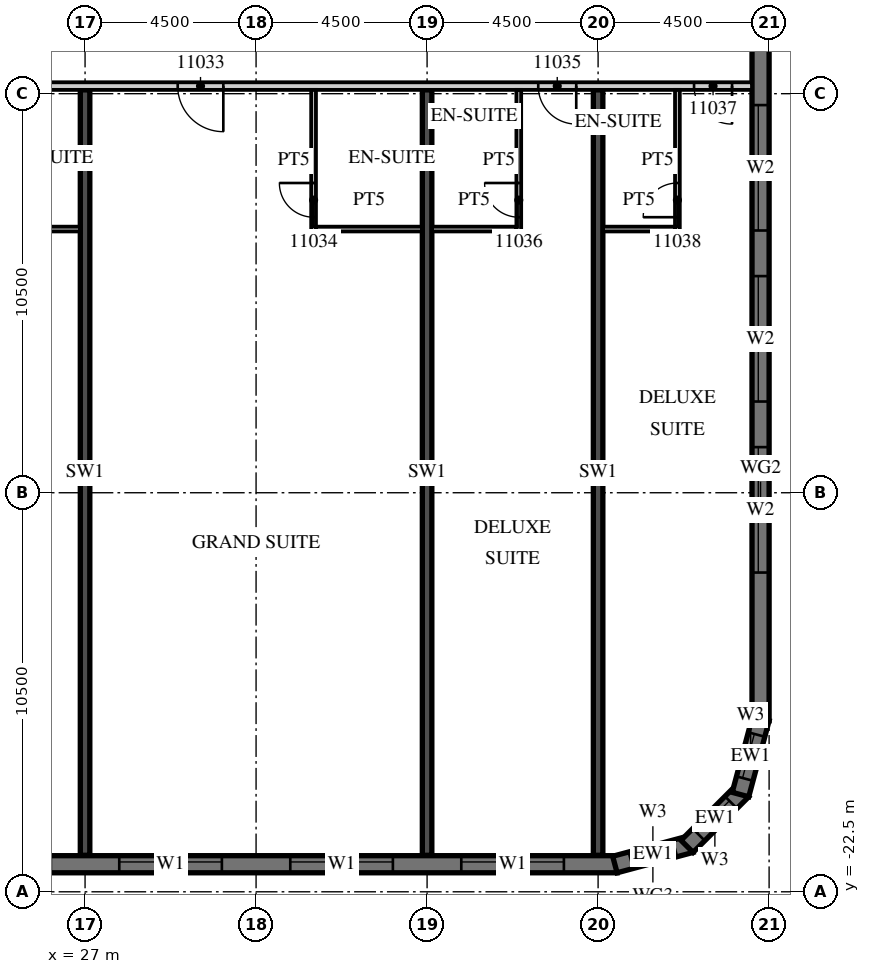
"""IFC4 building model, lengths in metres.
Left out: names, types, materials, properties, quantities, classifications, styles, units other than length and angle.
Written with IfcOpenShell. Run it as: python <this file> out.ifc"""

import sys

from ifc_helpers import new_model, si_unit, direction, frame, frame_2d, origin, place, context, subcontext, project, spatial, polyline, rectangle, outline, extrude, element, fill, save


model = new_model("IFC4")
c1 = context("Model", 3, precision=1e-05, world=origin(), true_north=direction((0.0, 1.0)))
c2 = subcontext(c1, "Body", "Model", "MODEL_VIEW")
j1 = project(units=[si_unit("LENGTHUNIT", "METRE"), si_unit("PLANEANGLEUNIT", "RADIAN")], contexts=[c1])
p1 = place(None, origin())
s1 = spatial("IfcSite", under=j1, at=p1, CompositionType="ELEMENT")
p2 = place(p1, origin())
s2 = spatial("IfcBuilding", under=s1, at=p2, CompositionType="ELEMENT")
p3 = place(p2, frame((0.0, 0.0, 66.6)))
s3 = spatial("IfcBuildingStorey", under=s2, at=p3, CompositionType="ELEMENT", Elevation=66.6)
for number, where, z_axis, x_axis in (
    (1, (27.0, -21.54, 0.0), (0.0, 0.0, 1.0), (0.0, 1.0, 0.0)),
    (2, (36.0, -21.54, 0.0), (0.0, 0.0, 1.0), (0.0, 1.0, 0.0)),
    (3, (40.5, -21.54, 0.0), (0.0, 0.0, 1.0), (0.0, 1.0, 0.0)),
):
    element("IfcWall", number, at=place(p3, frame(where, z_axis=z_axis, x_axis=x_axis)), inside=s3, PredefinedType="SHEAR", context=c2, shape_type="SweptSolid", body=[
        extrude(rectangle(XDim=20.14, YDim=0.25, at=frame_2d((10.07, 0.0))), origin(), (0.0, 0.0, 1.0), 3.3),
    ])
p4 = place(p3, frame((-13.5, -21.775, 0.0), z_axis=(0.0, 0.0, 1.0), x_axis=(1.0, 0.0, 0.0)))
e4 = element("IfcWall", 4, at=p4, inside=s3, PredefinedType="SOLIDWALL", context=c2, shape_type="SweptSolid", body=[
    extrude(rectangle(XDim=54.5, YDim=0.45, at=frame_2d((27.25, 0.0))), origin(), (0.0, 0.0, 1.0), 3.02),
])
p5 = place(p4, frame((0.9, 0.0, 0.45)))
e5 = element("IfcOpeningElement", 5, at=p5, cuts=e4, PredefinedType="OPENING", context=c2, shape_type="SweptSolid", body=[
    extrude(rectangle(XDim=2.7, YDim=2.25, at=frame_2d((1.35, 1.125))), frame((0.0, 0.235, 0.0), z_axis=(0.0, -1.0, 0.0), x_axis=(1.0, 0.0, 0.0)), (0.0, 0.0, 1.0), 0.47),
])
p6 = place(p4, frame((5.4, 0.0, 0.45)))
e6 = element("IfcOpeningElement", 6, at=p6, cuts=e4, PredefinedType="OPENING", context=c2, shape_type="SweptSolid", body=[
    extrude(rectangle(XDim=2.7, YDim=2.25, at=frame_2d((1.35, 1.125))), frame((0.0, 0.235, 0.0), z_axis=(0.0, -1.0, 0.0), x_axis=(1.0, 0.0, 0.0)), (0.0, 0.0, 1.0), 0.47),
])
p7 = place(p4, frame((9.9, 0.0, 0.45)))
e7 = element("IfcOpeningElement", 7, at=p7, cuts=e4, PredefinedType="OPENING", context=c2, shape_type="SweptSolid", body=[
    extrude(rectangle(XDim=2.7, YDim=2.25, at=frame_2d((1.35, 1.125))), frame((0.0, 0.235, 0.0), z_axis=(0.0, -1.0, 0.0), x_axis=(1.0, 0.0, 0.0)), (0.0, 0.0, 1.0), 0.47),
])
p8 = place(p4, frame((14.4, 0.0, 0.45)))
e8 = element("IfcOpeningElement", 8, at=p8, cuts=e4, PredefinedType="OPENING", context=c2, shape_type="SweptSolid", body=[
    extrude(rectangle(XDim=2.7, YDim=2.25, at=frame_2d((1.35, 1.125))), frame((0.0, 0.235, 0.0), z_axis=(0.0, -1.0, 0.0), x_axis=(1.0, 0.0, 0.0)), (0.0, 0.0, 1.0), 0.47),
])
p9 = place(p4, frame((18.9, 0.0, 0.45)))
e9 = element("IfcOpeningElement", 9, at=p9, cuts=e4, PredefinedType="OPENING", context=c2, shape_type="SweptSolid", body=[
    extrude(rectangle(XDim=2.7, YDim=2.25, at=frame_2d((1.35, 1.125))), frame((0.0, 0.235, 0.0), z_axis=(0.0, -1.0, 0.0), x_axis=(1.0, 0.0, 0.0)), (0.0, 0.0, 1.0), 0.47),
])
p10 = place(p4, frame((23.4, 0.0, 0.45)))
e10 = element("IfcOpeningElement", 10, at=p10, cuts=e4, PredefinedType="OPENING", context=c2, shape_type="SweptSolid", body=[
    extrude(rectangle(XDim=2.7, YDim=2.25, at=frame_2d((1.35, 1.125))), frame((0.0, 0.235, 0.0), z_axis=(0.0, -1.0, 0.0), x_axis=(1.0, 0.0, 0.0)), (0.0, 0.0, 1.0), 0.47),
])
p11 = place(p4, frame((27.9, 0.0, 0.45)))
e11 = element("IfcOpeningElement", 11, at=p11, cuts=e4, PredefinedType="OPENING", context=c2, shape_type="SweptSolid", body=[
    extrude(rectangle(XDim=2.7, YDim=2.25, at=frame_2d((1.35, 1.125))), frame((0.0, 0.235, 0.0), z_axis=(0.0, -1.0, 0.0), x_axis=(1.0, 0.0, 0.0)), (0.0, 0.0, 1.0), 0.47),
])
p12 = place(p4, frame((32.4, 0.0, 0.45)))
e12 = element("IfcOpeningElement", 12, at=p12, cuts=e4, PredefinedType="OPENING", context=c2, shape_type="SweptSolid", body=[
    extrude(rectangle(XDim=2.7, YDim=2.25, at=frame_2d((1.35, 1.125))), frame((0.0, 0.235, 0.0), z_axis=(0.0, -1.0, 0.0), x_axis=(1.0, 0.0, 0.0)), (0.0, 0.0, 1.0), 0.47),
])
p13 = place(p4, frame((36.9, 0.0, 0.45)))
e13 = element("IfcOpeningElement", 13, at=p13, cuts=e4, PredefinedType="OPENING", context=c2, shape_type="SweptSolid", body=[
    extrude(rectangle(XDim=2.7, YDim=2.25, at=frame_2d((1.35, 1.125))), frame((0.0, 0.235, 0.0), z_axis=(0.0, -1.0, 0.0), x_axis=(1.0, 0.0, 0.0)), (0.0, 0.0, 1.0), 0.47),
])
p14 = place(p4, frame((41.4, 0.0, 0.45)))
e14 = element("IfcOpeningElement", 14, at=p14, cuts=e4, PredefinedType="OPENING", context=c2, shape_type="SweptSolid", body=[
    extrude(rectangle(XDim=2.7, YDim=2.25, at=frame_2d((1.35, 1.125))), frame((0.0, 0.235, 0.0), z_axis=(0.0, -1.0, 0.0), x_axis=(1.0, 0.0, 0.0)), (0.0, 0.0, 1.0), 0.47),
])
p15 = place(p4, frame((45.9, 0.0, 0.45)))
e15 = element("IfcOpeningElement", 15, at=p15, cuts=e4, PredefinedType="OPENING", context=c2, shape_type="SweptSolid", body=[
    extrude(rectangle(XDim=2.7, YDim=2.25, at=frame_2d((1.35, 1.125))), frame((0.0, 0.235, 0.0), z_axis=(0.0, -1.0, 0.0), x_axis=(1.0, 0.0, 0.0)), (0.0, 0.0, 1.0), 0.47),
])
p16 = place(p4, frame((50.4, 0.0, 0.45)))
e16 = element("IfcOpeningElement", 16, at=p16, cuts=e4, PredefinedType="OPENING", context=c2, shape_type="SweptSolid", body=[
    extrude(rectangle(XDim=2.7, YDim=2.25, at=frame_2d((1.35, 1.125))), frame((0.0, 0.235, 0.0), z_axis=(0.0, -1.0, 0.0), x_axis=(1.0, 0.0, 0.0)), (0.0, 0.0, 1.0), 0.47),
])
p17 = place(p3, frame((40.942, -21.783, 0.0), z_axis=(0.0, 0.0, 1.0), x_axis=(0.965926999034, 0.25881466832, 0.0)))
e17 = element("IfcWall", 17, at=p17, inside=s3, PredefinedType="SOLIDWALL", context=c2, shape_type="SweptSolid", body=[
    extrude(outline(polyline([(0.0, -0.225), (2.071, -0.225), (1.95, 0.225), (0.121, 0.225), (0.0, -0.225)])), origin(), (0.0, 0.0, 1.0), 3.02),
])
p18 = place(p17, frame((0.435, 0.0, 0.45)))
e18 = element("IfcOpeningElement", 18, at=p18, cuts=e17, PredefinedType="OPENING", context=c2, shape_type="SweptSolid", body=[
    extrude(rectangle(XDim=1.2, YDim=2.25, at=frame_2d((0.6, 1.125))), frame((0.0, 0.235, 0.0), z_axis=(0.0, -1.0, 0.0), x_axis=(1.0, 0.0, 0.0)), (0.0, 0.0, 1.0), 0.47),
])
p19 = place(p3, frame((42.841, -21.305, 0.0), z_axis=(0.0, 0.0, 1.0), x_axis=(0.707106781187, 0.707106781187, 0.0)))
e19 = element("IfcWall", 19, at=p19, inside=s3, PredefinedType="SOLIDWALL", context=c2, shape_type="SweptSolid", body=[
    extrude(outline(polyline([(0.0, -0.225), (2.071, -0.225), (1.95, 0.225), (0.121, 0.225), (0.0, -0.225)])), origin(), (0.0, 0.0, 1.0), 3.02),
])
p20 = place(p19, frame((0.435, 0.0, 0.45)))
e20 = element("IfcOpeningElement", 20, at=p20, cuts=e19, PredefinedType="OPENING", context=c2, shape_type="SweptSolid", body=[
    extrude(rectangle(XDim=1.2, YDim=2.25, at=frame_2d((0.6, 1.125))), frame((0.0, 0.235, 0.0), z_axis=(0.0, -1.0, 0.0), x_axis=(1.0, 0.0, 0.0)), (0.0, 0.0, 1.0), 0.47),
])
p21 = place(p3, frame((44.247, -19.942, 0.0), z_axis=(0.0, 0.0, 1.0), x_axis=(0.25881466832, 0.965926999034, 0.0)))
e21 = element("IfcWall", 21, at=p21, inside=s3, PredefinedType="SOLIDWALL", context=c2, shape_type="SweptSolid", body=[
    extrude(outline(polyline([(-0.0, -0.225), (2.07, -0.225), (1.95, 0.225), (0.12, 0.225), (-0.0, -0.225)])), origin(), (0.0, 0.0, 1.0), 3.02),
])
p22 = place(p21, frame((0.435, 0.0, 0.45)))
e22 = element("IfcOpeningElement", 22, at=p22, cuts=e21, PredefinedType="OPENING", context=c2, shape_type="SweptSolid", body=[
    extrude(rectangle(XDim=1.2, YDim=2.25, at=frame_2d((0.6, 1.125))), frame((0.0, 0.235, 0.0), z_axis=(0.0, -1.0, 0.0), x_axis=(1.0, 0.0, 0.0)), (0.0, 0.0, 1.0), 0.47),
])
p23 = place(p3, frame((44.775, -18.0, 0.0), z_axis=(0.0, 0.0, 1.0), x_axis=(0.0, 1.0, 0.0)))
e23 = element("IfcWall", 23, at=p23, inside=s3, PredefinedType="SOLIDWALL", context=c2, shape_type="SweptSolid", body=[
    extrude(rectangle(XDim=36.0, YDim=0.45, at=frame_2d((18.0, 0.0))), origin(), (0.0, 0.0, 1.0), 3.02),
])
p24 = place(p23, frame((3.9, 0.0, 0.45)))
e24 = element("IfcOpeningElement", 24, at=p24, cuts=e23, PredefinedType="OPENING", context=c2, shape_type="SweptSolid", body=[
    extrude(rectangle(XDim=3.3, YDim=2.25, at=frame_2d((1.65, 1.125))), frame((0.0, 0.235, 0.0), z_axis=(0.0, -1.0, 0.0), x_axis=(1.0, 0.0, 0.0)), (0.0, 0.0, 1.0), 0.47),
])
p25 = place(p23, frame((8.4, 0.0, 0.45)))
e25 = element("IfcOpeningElement", 25, at=p25, cuts=e23, PredefinedType="OPENING", context=c2, shape_type="SweptSolid", body=[
    extrude(rectangle(XDim=3.3, YDim=2.25, at=frame_2d((1.65, 1.125))), frame((0.0, 0.235, 0.0), z_axis=(0.0, -1.0, 0.0), x_axis=(1.0, 0.0, 0.0)), (0.0, 0.0, 1.0), 0.47),
])
p26 = place(p23, frame((12.9, 0.0, 0.45)))
e26 = element("IfcOpeningElement", 26, at=p26, cuts=e23, PredefinedType="OPENING", context=c2, shape_type="SweptSolid", body=[
    extrude(rectangle(XDim=3.3, YDim=2.25, at=frame_2d((1.65, 1.125))), frame((0.0, 0.235, 0.0), z_axis=(0.0, -1.0, 0.0), x_axis=(1.0, 0.0, 0.0)), (0.0, 0.0, 1.0), 0.47),
])
p27 = place(p3, frame((-13.5, -1.3, 0.0), z_axis=(0.0, 0.0, 1.0), x_axis=(1.0, 0.0, 0.0)))
e27 = element("IfcWall", 27, at=p27, inside=s3, PredefinedType="PARTITIONING", context=c2, shape_type="SweptSolid", body=[
    extrude(rectangle(XDim=58.05, YDim=0.2, at=frame_2d((29.025, 0.0))), origin(), (0.0, 0.0, 1.0), 3.02),
])
p28 = place(p27, frame((2.925, 0.0, 0.0)))
e28 = element("IfcOpeningElement", 28, at=p28, cuts=e27, PredefinedType="OPENING", context=c2, shape_type="SweptSolid", body=[
    extrude(rectangle(XDim=1.0, YDim=2.1, at=frame_2d((0.5, 1.05))), frame((0.0, 0.11, 0.0), z_axis=(0.0, -1.0, 0.0), x_axis=(1.0, 0.0, 0.0)), (0.0, 0.0, 1.0), 0.22),
])
p29 = place(p27, frame((9.863, 0.0, 0.0)))
e29 = element("IfcOpeningElement", 29, at=p29, cuts=e27, PredefinedType="OPENING", context=c2, shape_type="SweptSolid", body=[
    extrude(rectangle(XDim=1.2, YDim=2.1, at=frame_2d((0.6, 1.05))), frame((0.0, 0.11, 0.0), z_axis=(0.0, -1.0, 0.0), x_axis=(1.0, 0.0, 0.0)), (0.0, 0.0, 1.0), 0.22),
])
p30 = place(p27, frame((16.45, 0.0, 0.0)))
e30 = element("IfcOpeningElement", 30, at=p30, cuts=e27, PredefinedType="OPENING", context=c2, shape_type="SweptSolid", body=[
    extrude(rectangle(XDim=1.0, YDim=2.1, at=frame_2d((0.5, 1.05))), frame((0.0, 0.11, 0.0), z_axis=(0.0, -1.0, 0.0), x_axis=(1.0, 0.0, 0.0)), (0.0, 0.0, 1.0), 0.22),
])
p31 = place(p27, frame((18.55, 0.0, 0.0)))
e31 = element("IfcOpeningElement", 31, at=p31, cuts=e27, PredefinedType="OPENING", context=c2, shape_type="SweptSolid", body=[
    extrude(rectangle(XDim=1.0, YDim=2.1, at=frame_2d((0.5, 1.05))), frame((0.0, 0.11, 0.0), z_axis=(0.0, -1.0, 0.0), x_axis=(1.0, 0.0, 0.0)), (0.0, 0.0, 1.0), 0.22),
])
p32 = place(p27, frame((24.938, 0.0, 0.0)))
e32 = element("IfcOpeningElement", 32, at=p32, cuts=e27, PredefinedType="OPENING", context=c2, shape_type="SweptSolid", body=[
    extrude(rectangle(XDim=1.2, YDim=2.1, at=frame_2d((0.6, 1.05))), frame((0.0, 0.11, 0.0), z_axis=(0.0, -1.0, 0.0), x_axis=(1.0, 0.0, 0.0)), (0.0, 0.0, 1.0), 0.22),
])
p33 = place(p27, frame((33.938, 0.0, 0.0)))
e33 = element("IfcOpeningElement", 33, at=p33, cuts=e27, PredefinedType="OPENING", context=c2, shape_type="SweptSolid", body=[
    extrude(rectangle(XDim=1.2, YDim=2.1, at=frame_2d((0.6, 1.05))), frame((0.0, 0.11, 0.0), z_axis=(0.0, -1.0, 0.0), x_axis=(1.0, 0.0, 0.0)), (0.0, 0.0, 1.0), 0.22),
])
p34 = place(p27, frame((42.938, 0.0, 0.0)))
e34 = element("IfcOpeningElement", 34, at=p34, cuts=e27, PredefinedType="OPENING", context=c2, shape_type="SweptSolid", body=[
    extrude(rectangle(XDim=1.2, YDim=2.1, at=frame_2d((0.6, 1.05))), frame((0.0, 0.11, 0.0), z_axis=(0.0, -1.0, 0.0), x_axis=(1.0, 0.0, 0.0)), (0.0, 0.0, 1.0), 0.22),
])
p35 = place(p27, frame((52.425, 0.0, 0.0)))
e35 = element("IfcOpeningElement", 35, at=p35, cuts=e27, PredefinedType="OPENING", context=c2, shape_type="SweptSolid", body=[
    extrude(rectangle(XDim=1.0, YDim=2.1, at=frame_2d((0.5, 1.05))), frame((0.0, 0.11, 0.0), z_axis=(0.0, -1.0, 0.0), x_axis=(1.0, 0.0, 0.0)), (0.0, 0.0, 1.0), 0.22),
])
p36 = place(p27, frame((56.525, 0.0, 0.0)))
e36 = element("IfcOpeningElement", 36, at=p36, cuts=e27, PredefinedType="OPENING", context=c2, shape_type="SweptSolid", body=[
    extrude(rectangle(XDim=1.0, YDim=2.1, at=frame_2d((0.5, 1.05))), frame((0.0, 0.11, 0.0), z_axis=(0.0, -1.0, 0.0), x_axis=(1.0, 0.0, 0.0)), (0.0, 0.0, 1.0), 0.22),
])
p37 = place(p3, frame((24.075, -5.062, 0.0), z_axis=(0.0, 0.0, 1.0), x_axis=(1.0, 0.0, 0.0)))
e37 = element("IfcWall", 37, at=p37, inside=s3, PredefinedType="PARTITIONING", context=c2, shape_type="SweptSolid", body=[
    extrude(rectangle(XDim=2.8, YDim=0.125, at=frame_2d((1.4, 0.0))), origin(), (0.0, 0.0, 1.0), 3.02),
])
p38 = place(p3, frame((33.013, -5.125, 0.0), z_axis=(0.0, 0.0, 1.0), x_axis=(0.0, 1.0, 0.0)))
e38 = element("IfcWall", 38, at=p38, inside=s3, PredefinedType="PARTITIONING", context=c2, shape_type="SweptSolid", body=[
    extrude(rectangle(XDim=3.725, YDim=0.125, at=frame_2d((1.863, 0.0))), origin(), (0.0, 0.0, 1.0), 3.02),
])
p39 = place(p38, frame((0.375, 0.0, 0.0)))
e39 = element("IfcOpeningElement", 39, at=p39, cuts=e38, PredefinedType="OPENING", context=c2, shape_type="SweptSolid", body=[
    extrude(rectangle(XDim=0.9, YDim=2.1, at=frame_2d((0.45, 1.05))), frame((0.0, 0.073, 0.0), z_axis=(0.0, -1.0, 0.0), x_axis=(1.0, 0.0, 0.0)), (0.0, 0.0, 1.0), 0.145),
])
p40 = place(p3, frame((33.075, -5.062, 0.0), z_axis=(0.0, 0.0, 1.0), x_axis=(1.0, 0.0, 0.0)))
e40 = element("IfcWall", 40, at=p40, inside=s3, PredefinedType="PARTITIONING", context=c2, shape_type="SweptSolid", body=[
    extrude(rectangle(XDim=2.8, YDim=0.125, at=frame_2d((1.4, 0.0))), origin(), (0.0, 0.0, 1.0), 3.02),
])
p41 = place(p3, frame((38.413, -5.125, 0.0), z_axis=(0.0, 0.0, 1.0), x_axis=(0.0, 1.0, 0.0)))
e41 = element("IfcWall", 41, at=p41, inside=s3, PredefinedType="PARTITIONING", context=c2, shape_type="SweptSolid", body=[
    extrude(rectangle(XDim=3.725, YDim=0.125, at=frame_2d((1.863, 0.0))), origin(), (0.0, 0.0, 1.0), 3.02),
])
p42 = place(p41, frame((0.375, 0.0, 0.0)))
e42 = element("IfcOpeningElement", 42, at=p42, cuts=e41, PredefinedType="OPENING", context=c2, shape_type="SweptSolid", body=[
    extrude(rectangle(XDim=0.9, YDim=2.1, at=frame_2d((0.45, 1.05))), frame((0.0, 0.073, 0.0), z_axis=(0.0, -1.0, 0.0), x_axis=(1.0, 0.0, 0.0)), (0.0, 0.0, 1.0), 0.145),
])
p43 = place(p3, frame((36.125, -5.062, 0.0), z_axis=(0.0, 0.0, 1.0), x_axis=(1.0, 0.0, 0.0)))
e43 = element("IfcWall", 43, at=p43, inside=s3, PredefinedType="PARTITIONING", context=c2, shape_type="SweptSolid", body=[
    extrude(rectangle(XDim=2.225, YDim=0.125, at=frame_2d((1.113, 0.0))), origin(), (0.0, 0.0, 1.0), 3.02),
])
p44 = place(p3, frame((42.587, -5.125, 0.0), z_axis=(0.0, 0.0, 1.0), x_axis=(0.0, 1.0, 0.0)))
e44 = element("IfcWall", 44, at=p44, inside=s3, PredefinedType="PARTITIONING", context=c2, shape_type="SweptSolid", body=[
    extrude(rectangle(XDim=3.725, YDim=0.125, at=frame_2d((1.863, 0.0))), origin(), (0.0, 0.0, 1.0), 3.02),
])
p45 = place(p44, frame((0.375, 0.0, 0.0)))
e45 = element("IfcOpeningElement", 45, at=p45, cuts=e44, PredefinedType="OPENING", context=c2, shape_type="SweptSolid", body=[
    extrude(rectangle(XDim=0.9, YDim=2.1, at=frame_2d((0.45, 1.05))), frame((0.0, 0.073, 0.0), z_axis=(0.0, -1.0, 0.0), x_axis=(1.0, 0.0, 0.0)), (0.0, 0.0, 1.0), 0.145),
])
p46 = place(p3, frame((40.625, -5.062, 0.0), z_axis=(0.0, 0.0, 1.0), x_axis=(1.0, 0.0, 0.0)))
e46 = element("IfcWall", 46, at=p46, inside=s3, PredefinedType="PARTITIONING", context=c2, shape_type="SweptSolid", body=[
    extrude(rectangle(XDim=1.9, YDim=0.125, at=frame_2d((0.95, 0.0))), origin(), (0.0, 0.0, 1.0), 3.02),
])
p47 = place(p14, origin())
e47 = element("IfcWindow", 47, at=p47, inside=s3, PartitioningType="SINGLE_PANEL", PredefinedType="WINDOW", context=c2, shape_type="SweptSolid", body=[
    extrude(rectangle(XDim=2.7, YDim=2.25, at=frame_2d((1.35, 1.125))), frame((0.0, 0.09, 0.0), z_axis=(0.0, -1.0, 0.0), x_axis=(1.0, 0.0, 0.0)), (0.0, 0.0, 1.0), 0.06),
])
fill(e14, e47)
p48 = place(p15, origin())
e48 = element("IfcWindow", 48, at=p48, inside=s3, PartitioningType="SINGLE_PANEL", PredefinedType="WINDOW", context=c2, shape_type="SweptSolid", body=[
    extrude(rectangle(XDim=2.7, YDim=2.25, at=frame_2d((1.35, 1.125))), frame((0.0, 0.09, 0.0), z_axis=(0.0, -1.0, 0.0), x_axis=(1.0, 0.0, 0.0)), (0.0, 0.0, 1.0), 0.06),
])
fill(e15, e48)
p49 = place(p16, origin())
e49 = element("IfcWindow", 49, at=p49, inside=s3, PartitioningType="SINGLE_PANEL", PredefinedType="WINDOW", context=c2, shape_type="SweptSolid", body=[
    extrude(rectangle(XDim=2.7, YDim=2.25, at=frame_2d((1.35, 1.125))), frame((0.0, 0.09, 0.0), z_axis=(0.0, -1.0, 0.0), x_axis=(1.0, 0.0, 0.0)), (0.0, 0.0, 1.0), 0.06),
])
fill(e16, e49)
p50 = place(p18, origin())
e50 = element("IfcWindow", 50, at=p50, inside=s3, PartitioningType="SINGLE_PANEL", PredefinedType="WINDOW", context=c2, shape_type="SweptSolid", body=[
    extrude(rectangle(XDim=1.2, YDim=2.25, at=frame_2d((0.6, 1.125))), frame((0.0, 0.09, 0.0), z_axis=(0.0, -1.0, 0.0), x_axis=(1.0, 0.0, 0.0)), (0.0, 0.0, 1.0), 0.06),
])
fill(e18, e50)
p51 = place(p20, origin())
e51 = element("IfcWindow", 51, at=p51, inside=s3, PartitioningType="SINGLE_PANEL", PredefinedType="WINDOW", context=c2, shape_type="SweptSolid", body=[
    extrude(rectangle(XDim=1.2, YDim=2.25, at=frame_2d((0.6, 1.125))), frame((0.0, 0.09, 0.0), z_axis=(0.0, -1.0, 0.0), x_axis=(1.0, 0.0, 0.0)), (0.0, 0.0, 1.0), 0.06),
])
fill(e20, e51)
p52 = place(p22, origin())
e52 = element("IfcWindow", 52, at=p52, inside=s3, PartitioningType="SINGLE_PANEL", PredefinedType="WINDOW", context=c2, shape_type="SweptSolid", body=[
    extrude(rectangle(XDim=1.2, YDim=2.25, at=frame_2d((0.6, 1.125))), frame((0.0, 0.09, 0.0), z_axis=(0.0, -1.0, 0.0), x_axis=(1.0, 0.0, 0.0)), (0.0, 0.0, 1.0), 0.06),
])
fill(e22, e52)
p53 = place(p24, origin())
e53 = element("IfcWindow", 53, at=p53, inside=s3, PartitioningType="SINGLE_PANEL", PredefinedType="WINDOW", context=c2, shape_type="SweptSolid", body=[
    extrude(rectangle(XDim=3.3, YDim=2.25, at=frame_2d((1.65, 1.125))), frame((0.0, 0.09, 0.0), z_axis=(0.0, -1.0, 0.0), x_axis=(1.0, 0.0, 0.0)), (0.0, 0.0, 1.0), 0.06),
])
fill(e24, e53)
p54 = place(p25, origin())
e54 = element("IfcWindow", 54, at=p54, inside=s3, PartitioningType="SINGLE_PANEL", PredefinedType="WINDOW", context=c2, shape_type="SweptSolid", body=[
    extrude(rectangle(XDim=3.3, YDim=2.25, at=frame_2d((1.65, 1.125))), frame((0.0, 0.09, 0.0), z_axis=(0.0, -1.0, 0.0), x_axis=(1.0, 0.0, 0.0)), (0.0, 0.0, 1.0), 0.06),
])
fill(e25, e54)
p55 = place(p26, origin())
e55 = element("IfcWindow", 55, at=p55, inside=s3, PartitioningType="SINGLE_PANEL", PredefinedType="WINDOW", context=c2, shape_type="SweptSolid", body=[
    extrude(rectangle(XDim=3.3, YDim=2.25, at=frame_2d((1.65, 1.125))), frame((0.0, 0.09, 0.0), z_axis=(0.0, -1.0, 0.0), x_axis=(1.0, 0.0, 0.0)), (0.0, 0.0, 1.0), 0.06),
])
fill(e26, e55)
p56 = place(p34, origin())
e56 = element("IfcDoor", 56, at=p56, inside=s3, OperationType="SINGLE_SWING_RIGHT", PredefinedType="DOOR", context=c2, shape_type="SweptSolid", body=[
    extrude(rectangle(XDim=1.2, YDim=2.1, at=frame_2d((0.6, 1.05))), frame((0.0, 0.025, 0.0), z_axis=(0.0, -1.0, 0.0), x_axis=(1.0, 0.0, 0.0)), (0.0, 0.0, 1.0), 0.05),
])
fill(e34, e56)
p57 = place(p39, origin())
e57 = element("IfcDoor", 57, at=p57, inside=s3, OperationType="SINGLE_SWING_RIGHT", PredefinedType="DOOR", context=c2, shape_type="SweptSolid", body=[
    extrude(rectangle(XDim=0.9, YDim=2.1, at=frame_2d((0.45, 1.05))), frame((0.0, 0.025, 0.0), z_axis=(0.0, -1.0, 0.0), x_axis=(1.0, 0.0, 0.0)), (0.0, 0.0, 1.0), 0.05),
])
fill(e39, e57)
p58 = place(p35, origin())
e58 = element("IfcDoor", 58, at=p58, inside=s3, OperationType="SINGLE_SWING_RIGHT", PredefinedType="DOOR", context=c2, shape_type="SweptSolid", body=[
    extrude(rectangle(XDim=1.0, YDim=2.1, at=frame_2d((0.5, 1.05))), frame((0.0, 0.025, 0.0), z_axis=(0.0, -1.0, 0.0), x_axis=(1.0, 0.0, 0.0)), (0.0, 0.0, 1.0), 0.05),
])
fill(e35, e58)
p59 = place(p42, origin())
e59 = element("IfcDoor", 59, at=p59, inside=s3, OperationType="SINGLE_SWING_RIGHT", PredefinedType="DOOR", context=c2, shape_type="SweptSolid", body=[
    extrude(rectangle(XDim=0.9, YDim=2.1, at=frame_2d((0.45, 1.05))), frame((0.0, 0.025, 0.0), z_axis=(0.0, -1.0, 0.0), x_axis=(1.0, 0.0, 0.0)), (0.0, 0.0, 1.0), 0.05),
])
fill(e42, e59)
p60 = place(p36, origin())
e60 = element("IfcDoor", 60, at=p60, inside=s3, OperationType="SINGLE_SWING_RIGHT", PredefinedType="DOOR", context=c2, shape_type="SweptSolid", body=[
    extrude(rectangle(XDim=1.0, YDim=2.1, at=frame_2d((0.5, 1.05))), frame((0.0, 0.025, 0.0), z_axis=(0.0, -1.0, 0.0), x_axis=(1.0, 0.0, 0.0)), (0.0, 0.0, 1.0), 0.05),
])
fill(e36, e60)
p61 = place(p45, origin())
e61 = element("IfcDoor", 61, at=p61, inside=s3, OperationType="SINGLE_SWING_LEFT", PredefinedType="DOOR", context=c2, shape_type="SweptSolid", body=[
    extrude(rectangle(XDim=0.9, YDim=2.1, at=frame_2d((0.45, 1.05))), frame((0.0, 0.025, 0.0), z_axis=(0.0, -1.0, 0.0), x_axis=(1.0, 0.0, 0.0)), (0.0, 0.0, 1.0), 0.05),
])
fill(e45, e61)
save(model, sys.argv[1])
